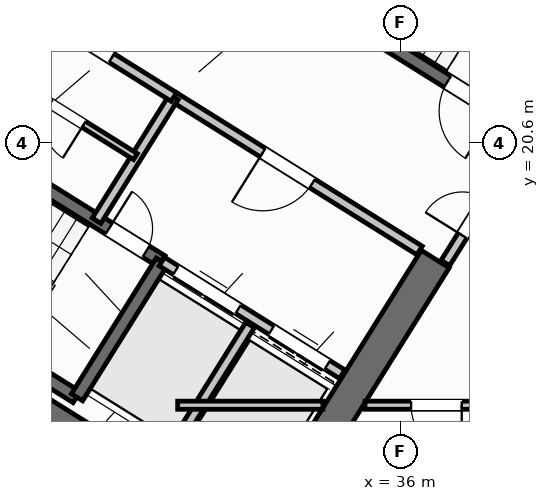
"""IFC4 building model, lengths in metres.
Left out: names, types, materials, properties, quantities, classifications, styles, units other than length and angle.
Written with IfcOpenShell. Run it as: python <this file> out.ifc"""

import sys

from ifc_helpers import new_model, si_unit, direction, frame, frame_2d, origin, place, context, subcontext, project, spatial, rectangle, extrude, source, transform, mapped, element, fill, save


model = new_model("IFC4")
c1 = context("Model", 3, precision=1e-05, world=origin(), true_north=direction((0.0, 1.0)))
c2 = subcontext(c1, "Body", "Model", "MODEL_VIEW")
j1 = project(units=[si_unit("LENGTHUNIT", "METRE"), si_unit("PLANEANGLEUNIT", "RADIAN")], contexts=[c1])
p1 = place(None, origin())
s1 = spatial("IfcSite", under=j1, at=p1, CompositionType="ELEMENT")
p2 = place(p1, origin())
s2 = spatial("IfcBuilding", under=s1, at=p2, CompositionType="ELEMENT")
p3 = place(p2, frame((0.0, 0.0, 34.8)))
s3 = spatial("IfcBuildingStorey", under=s2, at=p3, CompositionType="ELEMENT", Elevation=34.8)
p4 = place(p3, frame((33.409, 12.45, 0.0), z_axis=(0.0, 0.0, 1.0), x_axis=(-0.848051132073, 0.529914405721, 0.0)))
e1 = element("IfcWall", 1, at=p4, inside=s3, PredefinedType="SHEAR", context=c2, shape_type="SweptSolid", body=[
    extrude(rectangle(XDim=13.24, YDim=0.65, at=frame_2d((6.62, 0.0))), origin(), (0.0, 0.0, 1.0), 3.35),
])
p5 = place(p3, frame((36.683, 18.304, 0.0), z_axis=(0.0, 0.0, 1.0), x_axis=(-0.529899109053, -0.848060690178, 0.0)))
e2 = element("IfcWall", 2, at=p5, inside=s3, PredefinedType="SHEAR", context=c2, shape_type="SweptSolid", body=[
    extrude(rectangle(XDim=6.375, YDim=0.65, at=frame_2d((3.188, 0.0))), origin(), (0.0, 0.0, 1.0), 3.35),
])
p6 = place(p3, frame((29.268, 6.429, 0.0), z_axis=(0.0, 0.0, 1.0), x_axis=(-0.848049971435, 0.529916263149, 0.0)))
e3 = element("IfcWall", 3, at=p6, inside=s3, PredefinedType="STANDARD", context=c2, shape_type="SweptSolid", body=[
    extrude(rectangle(XDim=31.588, YDim=0.32, at=frame_2d((15.794, 0.0))), origin(), (0.0, 0.0, 1.0), 3.35),
])
p7 = place(p6, frame((16.362, 0.0, 0.0)))
e4 = element("IfcOpeningElement", 4, at=p7, cuts=e3, PredefinedType="OPENING", context=c2, shape_type="SweptSolid", body=[
    extrude(rectangle(XDim=1.2, YDim=2.15, at=frame_2d((0.6, 1.075))), frame((0.0, 0.17, 0.0), z_axis=(0.0, -1.0, 0.0), x_axis=(1.0, 0.0, 0.0)), (0.0, 0.0, 1.0), 0.34),
])
p8 = place(p6, frame((2.989, 0.0, 0.8)))
e5 = element("IfcOpeningElement", 5, at=p8, cuts=e3, PredefinedType="OPENING", context=c2, shape_type="SweptSolid", body=[
    extrude(rectangle(XDim=2.1, YDim=1.55, at=frame_2d((1.05, 0.775))), frame((0.0, 0.17, 0.0), z_axis=(0.0, -1.0, 0.0), x_axis=(1.0, 0.0, 0.0)), (0.0, 0.0, 1.0), 0.34),
])
p9 = place(p6, frame((8.359, 0.0, 0.8)))
e6 = element("IfcOpeningElement", 6, at=p9, cuts=e3, PredefinedType="OPENING", context=c2, shape_type="SweptSolid", body=[
    extrude(rectangle(XDim=2.1, YDim=1.55, at=frame_2d((1.05, 0.775))), frame((0.0, 0.17, 0.0), z_axis=(0.0, -1.0, 0.0), x_axis=(1.0, 0.0, 0.0)), (0.0, 0.0, 1.0), 0.34),
])
p10 = place(p6, frame((13.284, 0.0, 0.95)))
e7 = element("IfcOpeningElement", 7, at=p10, cuts=e3, PredefinedType="OPENING", context=c2, shape_type="SweptSolid", body=[
    extrude(rectangle(XDim=1.2, YDim=1.4, at=frame_2d((0.6, 0.7))), frame((0.0, 0.17, 0.0), z_axis=(0.0, -1.0, 0.0), x_axis=(1.0, 0.0, 0.0)), (0.0, 0.0, 1.0), 0.34),
])
p11 = place(p6, frame((20.39, 0.0, 0.95)))
e8 = element("IfcOpeningElement", 8, at=p11, cuts=e3, PredefinedType="OPENING", context=c2, shape_type="SweptSolid", body=[
    extrude(rectangle(XDim=1.2, YDim=1.4, at=frame_2d((0.6, 0.7))), frame((0.0, 0.17, 0.0), z_axis=(0.0, -1.0, 0.0), x_axis=(1.0, 0.0, 0.0)), (0.0, 0.0, 1.0), 0.34),
])
p12 = place(p6, frame((23.715, 0.0, 1.0)))
e9 = element("IfcOpeningElement", 9, at=p12, cuts=e3, PredefinedType="OPENING", context=c2, shape_type="SweptSolid", body=[
    extrude(rectangle(XDim=0.9, YDim=1.25, at=frame_2d((0.45, 0.625))), frame((0.0, 0.17, 0.0), z_axis=(0.0, -1.0, 0.0), x_axis=(1.0, 0.0, 0.0)), (0.0, 0.0, 1.0), 0.34),
])
p13 = place(p6, frame((27.481, 0.0, 0.8)))
e10 = element("IfcOpeningElement", 10, at=p13, cuts=e3, PredefinedType="OPENING", context=c2, shape_type="SweptSolid", body=[
    extrude(rectangle(XDim=2.1, YDim=1.55, at=frame_2d((1.05, 0.775))), frame((0.0, 0.17, 0.0), z_axis=(0.0, -1.0, 0.0), x_axis=(1.0, 0.0, 0.0)), (0.0, 0.0, 1.0), 0.34),
])
p14 = place(p3, frame((29.605, 15.581, 0.0), z_axis=(0.0, 0.0, 1.0), x_axis=(-0.848036911448, 0.529937163087, 0.0)))
e11 = element("IfcWall", 11, at=p14, inside=s3, PredefinedType="SHEAR", context=c2, shape_type="SweptSolid", body=[
    extrude(rectangle(XDim=7.46, YDim=0.26, at=frame_2d((3.73, 0.0))), origin(), (0.0, 0.0, 1.0), 3.35),
])
p15 = place(p3, frame((31.28, 18.261, 0.0), z_axis=(0.0, 0.0, 1.0), x_axis=(-0.848051618787, 0.529913626805, 0.0)))
e12 = element("IfcWall", 12, at=p15, inside=s3, PredefinedType="SHEAR", context=c2, shape_type="SweptSolid", body=[
    extrude(rectangle(XDim=7.46, YDim=0.26, at=frame_2d((3.73, 0.0))), origin(), (0.0, 0.0, 1.0), 3.35),
])
p16 = place(p15, frame((0.36, 0.0, 0.0)))
e13 = element("IfcOpeningElement", 13, at=p16, cuts=e12, PredefinedType="OPENING", context=c2, shape_type="SweptSolid", body=[
    extrude(rectangle(XDim=0.86, YDim=2.05, at=frame_2d((0.43, 1.025))), frame((0.0, 0.14, 0.0), z_axis=(0.0, -1.0, 0.0), x_axis=(1.0, 0.0, 0.0)), (0.0, 0.0, 1.0), 0.28),
])
p17 = place(p3, frame((31.288, 18.256, 0.0), z_axis=(0.0, 0.0, 1.0), x_axis=(-0.529943379326, -0.848033026897, 0.0)))
e14 = element("IfcWall", 14, at=p17, inside=s3, PredefinedType="SHEAR", context=c2, shape_type="SweptSolid", body=[
    extrude(rectangle(XDim=3.16, YDim=0.26, at=frame_2d((1.58, 0.0))), origin(), (0.0, 0.0, 1.0), 3.35),
])
p18 = place(p3, frame((38.046, 21.108, 0.0), z_axis=(0.0, 0.0, 1.0), x_axis=(-0.848054434086, 0.529909121291, 0.0)))
e15 = element("IfcWall", 15, at=p18, inside=s3, PredefinedType="SHEAR", context=c2, shape_type="SweptSolid", body=[
    extrude(rectangle(XDim=7.33, YDim=0.26, at=frame_2d((3.665, 0.0))), origin(), (0.0, 0.0, 1.0), 3.35),
])
p19 = place(p18, frame((0.22, 0.0, 0.0)))
e16 = element("IfcOpeningElement", 16, at=p19, cuts=e15, PredefinedType="OPENING", context=c2, shape_type="SweptSolid", body=[
    extrude(rectangle(XDim=1.1, YDim=2.1, at=frame_2d((0.55, 1.05))), frame((0.0, 0.14, 0.0), z_axis=(0.0, -1.0, 0.0), x_axis=(1.0, 0.0, 0.0)), (0.0, 0.0, 1.0), 0.28),
])
p20 = place(p3, frame((34.848, 16.031, 0.0), z_axis=(0.0, 0.0, 1.0), x_axis=(-0.848044042236, 0.529925751807, 0.0)))
e17 = element("IfcWall", 17, at=p20, inside=s3, PredefinedType="STANDARD", context=c2, shape_type="SweptSolid", body=[
    extrude(rectangle(XDim=4.198, YDim=0.2, at=frame_2d((2.099, 0.0))), origin(), (0.0, 0.0, 1.0), 3.34),
])
p21 = place(p20, frame((0.348, 0.0, 0.0)))
e18 = element("IfcOpeningElement", 18, at=p21, cuts=e17, PredefinedType="OPENING", context=c2, shape_type="SweptSolid", body=[
    extrude(rectangle(XDim=1.3, YDim=2.2, at=frame_2d((0.65, 1.1))), frame((0.0, 0.11, 0.0), z_axis=(0.0, -1.0, 0.0), x_axis=(1.0, 0.0, 0.0)), (0.0, 0.0, 1.0), 0.22),
])
p22 = place(p20, frame((2.423, 0.0, 0.0)))
e19 = element("IfcOpeningElement", 19, at=p22, cuts=e17, PredefinedType="OPENING", context=c2, shape_type="SweptSolid", body=[
    extrude(rectangle(XDim=1.45, YDim=2.25, at=frame_2d((0.725, 1.125))), frame((0.0, 0.11, 0.0), z_axis=(0.0, -1.0, 0.0), x_axis=(1.0, 0.0, 0.0)), (0.0, 0.0, 1.0), 0.22),
])
p23 = place(p3, frame((36.374, 18.474, 0.0), z_axis=(0.0, 0.0, 1.0), x_axis=(-0.848051071577, 0.529914502535, 0.0)))
e20 = element("IfcWall", 20, at=p23, inside=s3, PredefinedType="STANDARD", context=c2, shape_type="SweptSolid", body=[
    extrude(rectangle(XDim=5.718, YDim=0.2, at=frame_2d((2.859, 0.0))), origin(), (0.0, 0.0, 1.0), 3.34),
])
p24 = place(p23, frame((2.498, 0.0, 0.0)))
e21 = element("IfcOpeningElement", 21, at=p24, cuts=e20, PredefinedType="OPENING", context=c2, shape_type="SweptSolid", body=[
    extrude(rectangle(XDim=1.15, YDim=2.1, at=frame_2d((0.575, 1.05))), frame((0.0, 0.11, 0.0), z_axis=(0.0, -1.0, 0.0), x_axis=(1.0, 0.0, 0.0)), (0.0, 0.0, 1.0), 0.22),
])
p25 = place(p3, frame((33.029, 17.003, 0.0), z_axis=(0.0, 0.0, 1.0), x_axis=(-0.529916267533, -0.848049968695, 0.0)))
e22 = element("IfcWall", 22, at=p25, inside=s3, PredefinedType="STANDARD", context=c2, shape_type="SweptSolid", body=[
    extrude(rectangle(XDim=2.92, YDim=0.2, at=frame_2d((1.46, 0.0))), origin(), (0.0, 0.0, 1.0), 3.34),
])
p26 = place(p3, frame((31.525, 21.504, 0.0), z_axis=(0.0, 0.0, 1.0), x_axis=(-0.529907497854, -0.848055448493, 0.0)))
e23 = element("IfcWall", 23, at=p26, inside=s3, PredefinedType="STANDARD", context=c2, shape_type="SweptSolid", body=[
    extrude(rectangle(XDim=2.88, YDim=0.2, at=frame_2d((1.44, 0.0))), origin(), (0.0, 0.0, 1.0), 3.34),
])
p27 = place(p3, frame((31.525, 21.504, 0.0), z_axis=(0.0, 0.0, 1.0), x_axis=(-0.848044998614, 0.529924221305, 0.0)))
e24 = element("IfcWall", 24, at=p27, inside=s3, PredefinedType="STANDARD", context=c2, shape_type="SweptSolid", body=[
    extrude(rectangle(XDim=6.168, YDim=0.2, at=frame_2d((3.084, 0.0))), origin(), (0.0, 0.0, 1.0), 3.34),
])
p28 = place(p27, frame((4.4, 0.0, 0.0)))
e25 = element("IfcOpeningElement", 25, at=p28, cuts=e24, PredefinedType="OPENING", context=c2, shape_type="SweptSolid", body=[
    extrude(rectangle(XDim=0.86, YDim=2.05, at=frame_2d((0.43, 1.025))), frame((0.0, 0.11, 0.0), z_axis=(0.0, -1.0, 0.0), x_axis=(1.0, 0.0, 0.0)), (0.0, 0.0, 1.0), 0.22),
])
p29 = place(p27, frame((1.45, 0.0, 0.0)))
e26 = element("IfcOpeningElement", 26, at=p29, cuts=e24, PredefinedType="OPENING", context=c2, shape_type="SweptSolid", body=[
    extrude(rectangle(XDim=0.86, YDim=2.05, at=frame_2d((0.43, 1.025))), frame((0.0, 0.11, 0.0), z_axis=(0.0, -1.0, 0.0), x_axis=(1.0, 0.0, 0.0)), (0.0, 0.0, 1.0), 0.22),
])
p30 = place(p3, frame((30.766, 20.327, 0.0), z_axis=(0.0, 0.0, 1.0), x_axis=(-0.848052663127, 0.529911955482, 0.0)))
e27 = element("IfcWall", 27, at=p30, inside=s3, PredefinedType="PLUMBINGWALL", context=c2, shape_type="SweptSolid", body=[
    extrude(rectangle(XDim=3.28, YDim=0.14, at=frame_2d((1.64, 0.0))), origin(), (0.0, 0.0, 1.0), 3.34),
])
p31 = place(p30, frame((1.2, 0.0, 0.0)))
e28 = element("IfcOpeningElement", 28, at=p31, cuts=e27, PredefinedType="OPENING", context=c2, shape_type="SweptSolid", body=[
    extrude(rectangle(XDim=0.78, YDim=2.05, at=frame_2d((0.39, 1.025))), frame((0.0, 0.08, 0.0), z_axis=(0.0, -1.0, 0.0), x_axis=(1.0, 0.0, 0.0)), (0.0, 0.0, 1.0), 0.16),
])
p32 = place(p3, frame((32.164, 10.374, 0.0), z_axis=(0.0, 0.0, 1.0), x_axis=(-0.848044107957, 0.529925646633, 0.0)))
e29 = element("IfcWall", 29, at=p32, inside=s3, PredefinedType="PARTITIONING", context=c2, shape_type="SweptSolid", body=[
    extrude(rectangle(XDim=15.57, YDim=0.16, at=frame_2d((7.785, 0.0))), origin(), (0.0, 0.0, 1.0), 3.34),
])
p33 = place(p32, frame((10.83, 0.0, 0.0)))
e30 = element("IfcOpeningElement", 30, at=p33, cuts=e29, PredefinedType="OPENING", context=c2, shape_type="SweptSolid", body=[
    extrude(rectangle(XDim=1.0, YDim=2.1, at=frame_2d((0.5, 1.05))), frame((0.0, 0.09, 0.0), z_axis=(0.0, -1.0, 0.0), x_axis=(1.0, 0.0, 0.0)), (0.0, 0.0, 1.0), 0.18),
])
p34 = place(p3, frame((29.72, 8.859, 0.0), z_axis=(0.0, 0.0, 1.0), x_axis=(-0.848049134363, 0.529917602752, 0.0)))
e31 = element("IfcWall", 31, at=p34, inside=s3, PredefinedType="PLUMBINGWALL", context=c2, shape_type="SweptSolid", body=[
    extrude(rectangle(XDim=14.3, YDim=0.14, at=frame_2d((7.15, 0.0))), origin(), (0.0, 0.0, 1.0), 3.34),
])
p35 = place(p34, frame((9.57, 0.0, 0.0)))
e32 = element("IfcOpeningElement", 32, at=p35, cuts=e31, PredefinedType="OPENING", context=c2, shape_type="SweptSolid", body=[
    extrude(rectangle(XDim=0.92, YDim=2.08, at=frame_2d((0.46, 1.04))), frame((0.0, 0.08, 0.0), z_axis=(0.0, -1.0, 0.0), x_axis=(1.0, 0.0, 0.0)), (0.0, 0.0, 1.0), 0.16),
])
p36 = place(p3, frame((38.451, 20.737, 0.0), z_axis=(0.0, 0.0, 1.0), x_axis=(-0.529924799939, -0.848044637038, 0.0)))
e33 = element("IfcWall", 33, at=p36, inside=s3, PredefinedType="STANDARD", context=c2, shape_type="SweptSolid", body=[
    extrude(rectangle(XDim=2.96, YDim=0.2, at=frame_2d((1.48, 0.0))), origin(), (0.0, 0.0, 1.0), 3.34),
])
p37 = place(p36, frame((1.46, 0.0, 0.0)))
e34 = element("IfcOpeningElement", 34, at=p37, cuts=e33, PredefinedType="OPENING", context=c2, shape_type="SweptSolid", body=[
    extrude(rectangle(XDim=0.86, YDim=2.05, at=frame_2d((0.43, 1.025))), frame((0.0, 0.11, 0.0), z_axis=(0.0, -1.0, 0.0), x_axis=(1.0, 0.0, 0.0)), (0.0, 0.0, 1.0), 0.22),
])
p38 = place(p3, frame((31.6, 15.42, 0.0), z_axis=(0.0, 0.0, 1.0), x_axis=(1.0, 0.0, 0.0)))
e35 = element("IfcWall", 35, at=p38, inside=s3, PredefinedType="PARTITIONING", context=c2, shape_type="SweptSolid", body=[
    extrude(rectangle(XDim=2.866, YDim=0.16, at=frame_2d((1.433, 0.0))), origin(), (0.0, 0.0, 1.0), 3.34),
])
p39 = place(p3, frame((35.296, 15.42, 0.0), z_axis=(0.0, 0.0, 1.0), x_axis=(1.0, 0.0, 0.0)))
e36 = element("IfcWall", 36, at=p39, inside=s3, PredefinedType="PARTITIONING", context=c2, shape_type="SweptSolid", body=[
    extrude(rectangle(XDim=15.311, YDim=0.16, at=frame_2d((7.655, 0.0))), origin(), (0.0, 0.0, 1.0), 3.34),
])
p40 = place(p39, frame((0.91, 0.0, 0.0)))
e37 = element("IfcOpeningElement", 37, at=p40, cuts=e36, PredefinedType="OPENING", context=c2, shape_type="SweptSolid", body=[
    extrude(rectangle(XDim=1.0, YDim=2.1, at=frame_2d((0.5, 1.05))), frame((0.0, 0.09, 0.0), z_axis=(0.0, -1.0, 0.0), x_axis=(1.0, 0.0, 0.0)), (0.0, 0.0, 1.0), 0.18),
])
p41 = place(p39, frame((8.74, 0.0, 0.0)))
e38 = element("IfcOpeningElement", 38, at=p41, cuts=e36, PredefinedType="OPENING", context=c2, shape_type="SweptSolid", body=[
    extrude(rectangle(XDim=1.0, YDim=2.1, at=frame_2d((0.5, 1.05))), frame((0.0, 0.09, 0.0), z_axis=(0.0, -1.0, 0.0), x_axis=(1.0, 0.0, 0.0)), (0.0, 0.0, 1.0), 0.18),
])
m1 = source(origin(), c2, "Body", "SweptSolid", [
    extrude(rectangle(XDim=0.86, YDim=2.05, at=frame_2d((0.43, 1.025))), frame((0.0, 0.025, 0.0), z_axis=(0.0, -1.0, 0.0), x_axis=(1.0, 0.0, 0.0)), (0.0, 0.0, 1.0), 0.05),
])
p42 = place(p16, frame((0.86, 0.0, 0.0), z_axis=(0.0, 0.0, 1.0), x_axis=(-1.0, 0.0, 0.0)))
e39 = element("IfcDoor", 39, at=p42, inside=s3, OperationType="SINGLE_SWING_LEFT", PredefinedType="DOOR", context=c2, shape_type="MappedRepresentation", body=[
    mapped(m1, transform((0.0, 0.0, 0.0), scale=1.0)),
])
fill(e13, e39)
m2 = source(origin(), c2, "Body", "SweptSolid", [
    extrude(rectangle(XDim=1.1, YDim=2.1, at=frame_2d((0.55, 1.05))), frame((0.0, 0.025, 0.0), z_axis=(0.0, -1.0, 0.0), x_axis=(1.0, 0.0, 0.0)), (0.0, 0.0, 1.0), 0.05),
])
p43 = place(p19, origin())
e40 = element("IfcDoor", 40, at=p43, inside=s3, OperationType="SINGLE_SWING_LEFT", PredefinedType="DOOR", context=c2, shape_type="MappedRepresentation", body=[
    mapped(m2, transform((0.0, 0.0, 0.0), scale=1.0)),
])
fill(e16, e40)
m3 = source(origin(), c2, "Body", "SweptSolid", [
    extrude(rectangle(XDim=1.15, YDim=2.1, at=frame_2d((0.575, 1.05))), frame((0.0, 0.025, 0.0), z_axis=(0.0, -1.0, 0.0), x_axis=(1.0, 0.0, 0.0)), (0.0, 0.0, 1.0), 0.05),
])
p44 = place(p24, origin())
e41 = element("IfcDoor", 41, at=p44, inside=s3, OperationType="SINGLE_SWING_RIGHT", PredefinedType="DOOR", context=c2, shape_type="MappedRepresentation", body=[
    mapped(m3, transform((0.0, 0.0, 0.0), scale=1.0)),
])
fill(e21, e41)
m4 = source(origin(), c2, "Body", "SweptSolid", [
    extrude(rectangle(XDim=1.3, YDim=2.2, at=frame_2d((0.65, 1.1))), frame((0.0, 0.025, 0.0), z_axis=(0.0, -1.0, 0.0), x_axis=(1.0, 0.0, 0.0)), (0.0, 0.0, 1.0), 0.05),
])
p45 = place(p21, origin())
e42 = element("IfcDoor", 42, at=p45, inside=s3, OperationType="DOUBLE_DOOR_SLIDING", PredefinedType="DOOR", context=c2, shape_type="MappedRepresentation", body=[
    mapped(m4, transform((0.0, 0.0, 0.0), scale=1.0)),
])
fill(e18, e42)
m5 = source(origin(), c2, "Body", "SweptSolid", [
    extrude(rectangle(XDim=1.45, YDim=2.25, at=frame_2d((0.725, 1.125))), frame((0.0, 0.025, 0.0), z_axis=(0.0, -1.0, 0.0), x_axis=(1.0, 0.0, 0.0)), (0.0, 0.0, 1.0), 0.05),
])
p46 = place(p22, origin())
e43 = element("IfcDoor", 43, at=p46, inside=s3, OperationType="DOUBLE_DOOR_SLIDING", PredefinedType="DOOR", context=c2, shape_type="MappedRepresentation", body=[
    mapped(m5, transform((0.0, 0.0, 0.0), scale=1.0)),
])
fill(e19, e43)
p47 = place(p29, frame((0.86, 0.0, 0.0), z_axis=(0.0, 0.0, 1.0), x_axis=(-1.0, 0.0, 0.0)))
e44 = element("IfcDoor", 44, at=p47, inside=s3, OperationType="SINGLE_SWING_RIGHT", PredefinedType="DOOR", context=c2, shape_type="MappedRepresentation", body=[
    mapped(m1, transform((0.0, 0.0, 0.0), scale=1.0)),
])
fill(e26, e44)
m6 = source(origin(), c2, "Body", "SweptSolid", [
    extrude(rectangle(XDim=0.78, YDim=2.05, at=frame_2d((0.39, 1.025))), frame((0.0, 0.025, 0.0), z_axis=(0.0, -1.0, 0.0), x_axis=(1.0, 0.0, 0.0)), (0.0, 0.0, 1.0), 0.05),
])
p48 = place(p31, origin())
e45 = element("IfcDoor", 45, at=p48, inside=s3, OperationType="SINGLE_SWING_LEFT", PredefinedType="DOOR", context=c2, shape_type="MappedRepresentation", body=[
    mapped(m6, transform((0.0, 0.0, 0.0), scale=1.0)),
])
fill(e28, e45)
p49 = place(p37, frame((0.86, 0.0, 0.0), z_axis=(0.0, 0.0, 1.0), x_axis=(-1.0, 0.0, 0.0)))
e46 = element("IfcDoor", 46, at=p49, inside=s3, OperationType="SINGLE_SWING_LEFT", PredefinedType="DOOR", context=c2, shape_type="MappedRepresentation", body=[
    mapped(m1, transform((0.0, 0.0, 0.0), scale=1.0)),
])
fill(e34, e46)
m7 = source(origin(), c2, "Body", "SweptSolid", [
    extrude(rectangle(XDim=1.0, YDim=2.1, at=frame_2d((0.5, 1.05))), frame((0.0, 0.025, 0.0), z_axis=(0.0, -1.0, 0.0), x_axis=(1.0, 0.0, 0.0)), (0.0, 0.0, 1.0), 0.05),
])
p50 = place(p40, frame((1.0, 0.0, 0.0), z_axis=(0.0, 0.0, 1.0), x_axis=(-1.0, 0.0, 0.0)))
e47 = element("IfcDoor", 47, at=p50, inside=s3, OperationType="SINGLE_SWING_LEFT", PredefinedType="DOOR", context=c2, shape_type="MappedRepresentation", body=[
    mapped(m7, transform((0.0, 0.0, 0.0), scale=1.0)),
])
fill(e37, e47)
save(model, sys.argv[1])
